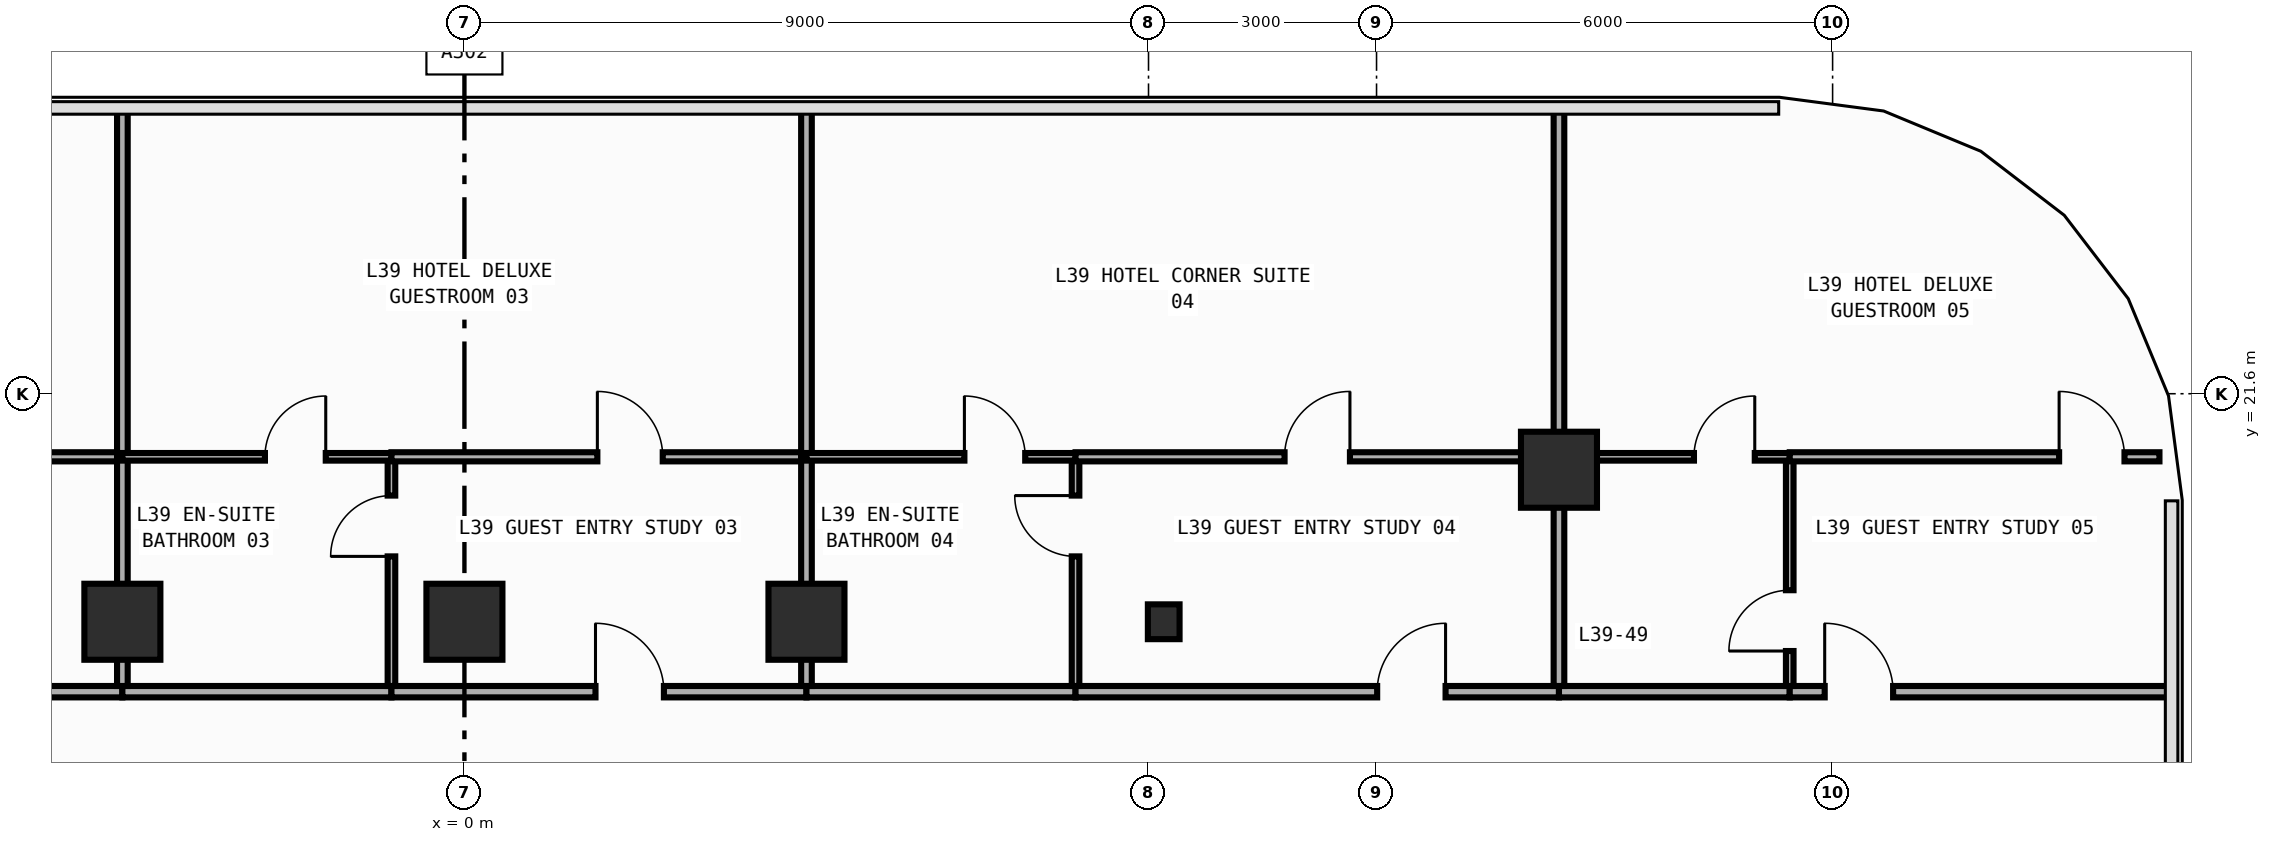
"""IFC4 building model, lengths in metres.
Left out: names, types, materials, properties, quantities, classifications, styles, units other than length and angle.
Written with IfcOpenShell. Run it as: python <this file> out.ifc"""

import sys

from ifc_helpers import new_model, si_unit, direction, frame, frame_2d, origin, origin_2d, place, context, subcontext, project, spatial, rectangle, i_section, extrude, element, fill, save


model = new_model("IFC4")
c1 = context("Model", 3, precision=1e-05, world=origin(), true_north=direction((0.0, 1.0)))
c2 = subcontext(c1, "Body", "Model", "MODEL_VIEW")
j1 = project(units=[si_unit("LENGTHUNIT", "METRE"), si_unit("PLANEANGLEUNIT", "RADIAN")], contexts=[c1])
p1 = place(None, origin())
s1 = spatial("IfcSite", under=j1, at=p1, CompositionType="ELEMENT")
p2 = place(p1, origin())
s2 = spatial("IfcBuilding", under=s1, at=p2, CompositionType="ELEMENT")
p3 = place(p2, frame((0.0, 0.0, 172.6)))
s3 = spatial("IfcBuildingStorey", under=s2, at=p3, CompositionType="ELEMENT", Elevation=172.6)
p4 = place(p3, frame((9.2, 18.6, 0.0), z_axis=(0.0, 0.0, 1.0), x_axis=(1.0, 0.0, 0.0)))
e1 = element("IfcColumn", 1, at=p4, inside=s3, PredefinedType="COLUMN", context=c2, shape_type="SweptSolid", body=[
    extrude(i_section(OverallWidth=0.417, OverallDepth=0.458, WebThickness=0.03, FlangeThickness=0.05, FilletRadius=0.022, at=origin_2d()), origin(), (0.0, 0.0, 1.0), 3.8),
])
for number, where, z_axis, x_axis in (
    (2, (-4.5, 18.6, 0.0), (0.0, 0.0, 1.0), (1.0, 0.0, 0.0)),
    (3, (0.0, 18.6, 0.0), (0.0, 0.0, 1.0), (1.0, 0.0, 0.0)),
    (4, (4.5, 18.6, 0.0), (0.0, 0.0, 1.0), (1.0, 0.0, 0.0)),
    (5, (14.4, 20.6, 0.0), (0.0, 0.0, 1.0), (1.0, 0.0, 0.0)),
):
    element("IfcColumn", number, at=place(p3, frame(where, z_axis=z_axis, x_axis=x_axis)), inside=s3, PredefinedType="COLUMN", context=c2, shape_type="SweptSolid", body=[
        extrude(rectangle(XDim=1.0, YDim=1.0, at=origin_2d()), origin(), (0.0, 0.0, 1.0), 3.8),
    ])
p5 = place(p3, frame((-10.86, 17.68, 0.0), z_axis=(0.0, 0.0, 1.0), x_axis=(1.0, 0.0, 0.0)))
e6 = element("IfcWall", 6, at=p5, inside=s3, PredefinedType="PARTITIONING", context=c2, shape_type="SweptSolid", body=[
    extrude(rectangle(XDim=6.36, YDim=0.15, at=frame_2d((3.18, 0.0))), origin(), (0.0, 0.0, 1.0), 3.54),
])
p6 = place(p5, frame((3.349, 0.0, 0.0)))
e7 = element("IfcOpeningElement", 7, at=p6, cuts=e6, PredefinedType="OPENING", context=c2, shape_type="SweptSolid", body=[
    extrude(rectangle(XDim=0.9, YDim=2.15, at=frame_2d((0.45, 1.075))), frame((0.0, 0.085, 0.0), z_axis=(0.0, -1.0, 0.0), x_axis=(1.0, 0.0, 0.0)), (0.0, 0.0, 1.0), 0.17),
])
p7 = place(p3, frame((-4.5, 17.68, 0.0), z_axis=(0.0, 0.0, 1.0), x_axis=(1.0, 0.0, 0.0)))
e8 = element("IfcWall", 8, at=p7, inside=s3, PredefinedType="PARTITIONING", context=c2, shape_type="SweptSolid", body=[
    extrude(rectangle(XDim=3.54, YDim=0.15, at=frame_2d((1.77, 0.0))), origin(), (0.0, 0.0, 1.0), 3.54),
])
p8 = place(p3, frame((-0.96, 17.68, 0.0), z_axis=(0.0, 0.0, 1.0), x_axis=(1.0, 0.0, 0.0)))
e9 = element("IfcWall", 9, at=p8, inside=s3, PredefinedType="PARTITIONING", context=c2, shape_type="SweptSolid", body=[
    extrude(rectangle(XDim=5.46, YDim=0.15, at=frame_2d((2.73, 0.0))), origin(), (0.0, 0.0, 1.0), 3.54),
])
p9 = place(p8, frame((2.684, 0.0, 0.0)))
e10 = element("IfcOpeningElement", 10, at=p9, cuts=e9, PredefinedType="OPENING", context=c2, shape_type="SweptSolid", body=[
    extrude(rectangle(XDim=0.9, YDim=2.15, at=frame_2d((0.45, 1.075))), frame((0.0, 0.085, 0.0), z_axis=(0.0, -1.0, 0.0), x_axis=(1.0, 0.0, 0.0)), (0.0, 0.0, 1.0), 0.17),
])
p10 = place(p3, frame((4.5, 17.68, 0.0), z_axis=(0.0, 0.0, 1.0), x_axis=(1.0, 0.0, 0.0)))
e11 = element("IfcWall", 11, at=p10, inside=s3, PredefinedType="PARTITIONING", context=c2, shape_type="SweptSolid", body=[
    extrude(rectangle(XDim=3.54, YDim=0.15, at=frame_2d((1.77, 0.0))), origin(), (0.0, 0.0, 1.0), 3.54),
])
p11 = place(p3, frame((8.04, 17.68, 0.0), z_axis=(0.0, 0.0, 1.0), x_axis=(1.0, 0.0, 0.0)))
e12 = element("IfcWall", 12, at=p11, inside=s3, PredefinedType="PARTITIONING", context=c2, shape_type="SweptSolid", body=[
    extrude(rectangle(XDim=6.36, YDim=0.15, at=frame_2d((3.18, 0.0))), origin(), (0.0, 0.0, 1.0), 3.54),
])
p12 = place(p11, frame((3.968, 0.0, 0.0)))
e13 = element("IfcOpeningElement", 13, at=p12, cuts=e12, PredefinedType="OPENING", context=c2, shape_type="SweptSolid", body=[
    extrude(rectangle(XDim=0.9, YDim=2.15, at=frame_2d((0.45, 1.075))), frame((0.0, 0.085, 0.0), z_axis=(0.0, -1.0, 0.0), x_axis=(1.0, 0.0, 0.0)), (0.0, 0.0, 1.0), 0.17),
])
p13 = place(p3, frame((14.4, 17.68, 0.0), z_axis=(0.0, 0.0, 1.0), x_axis=(1.0, 0.0, 0.0)))
e14 = element("IfcWall", 14, at=p13, inside=s3, PredefinedType="PARTITIONING", context=c2, shape_type="SweptSolid", body=[
    extrude(rectangle(XDim=3.036, YDim=0.15, at=frame_2d((1.518, 0.0))), origin(), (0.0, 0.0, 1.0), 3.54),
])
p14 = place(p3, frame((17.436, 17.68, 0.0), z_axis=(0.0, 0.0, 1.0), x_axis=(1.0, 0.0, 0.0)))
e15 = element("IfcWall", 15, at=p14, inside=s3, PredefinedType="PARTITIONING", context=c2, shape_type="SweptSolid", body=[
    extrude(rectangle(XDim=5.019, YDim=0.15, at=frame_2d((2.51, 0.0))), origin(), (0.0, 0.0, 1.0), 3.54),
])
p15 = place(p14, frame((0.46, 0.0, 0.0)))
e16 = element("IfcOpeningElement", 16, at=p15, cuts=e15, PredefinedType="OPENING", context=c2, shape_type="SweptSolid", body=[
    extrude(rectangle(XDim=0.9, YDim=2.15, at=frame_2d((0.45, 1.075))), frame((0.0, 0.085, 0.0), z_axis=(0.0, -1.0, 0.0), x_axis=(1.0, 0.0, 0.0)), (0.0, 0.0, 1.0), 0.17),
])
p16 = place(p3, frame((-10.86, 20.77, 0.0), z_axis=(0.0, 0.0, 1.0), x_axis=(1.0, 0.0, 0.0)))
e17 = element("IfcWall", 17, at=p16, inside=s3, PredefinedType="PARTITIONING", context=c2, shape_type="SweptSolid", body=[
    extrude(rectangle(XDim=6.36, YDim=0.12, at=frame_2d((3.18, 0.0))), origin(), (0.0, 0.0, 1.0), 3.54),
])
p17 = place(p16, frame((3.375, 0.0, 0.0)))
e18 = element("IfcOpeningElement", 18, at=p17, cuts=e17, PredefinedType="OPENING", context=c2, shape_type="SweptSolid", body=[
    extrude(rectangle(XDim=0.86, YDim=2.15, at=frame_2d((0.43, 1.075))), frame((0.0, 0.07, 0.0), z_axis=(0.0, -1.0, 0.0), x_axis=(1.0, 0.0, 0.0)), (0.0, 0.0, 1.0), 0.14),
])
p18 = place(p3, frame((-4.5, 17.755, 0.0), z_axis=(0.0, 0.0, 1.0), x_axis=(0.0, 1.0, 0.0)))
e19 = element("IfcWall", 19, at=p18, inside=s3, PredefinedType="PARTITIONING", context=c2, shape_type="SweptSolid", body=[
    extrude(rectangle(XDim=3.015, YDim=0.14, at=frame_2d((1.508, 0.0))), origin(), (0.0, 0.0, 1.0), 3.54),
])
p19 = place(p3, frame((-4.5, 20.77, 0.0), z_axis=(0.0, 0.0, 1.0), x_axis=(0.0, 1.0, 0.0)))
e20 = element("IfcWall", 20, at=p19, inside=s3, PredefinedType="PARTITIONING", context=c2, shape_type="SweptSolid", body=[
    extrude(rectangle(XDim=4.585, YDim=0.14, at=frame_2d((2.292, 0.0))), origin(), (0.0, 0.0, 1.0), 3.54),
])
p20 = place(p3, frame((-0.96, 17.755, 0.0), z_axis=(0.0, 0.0, 1.0), x_axis=(0.0, 1.0, 0.0)))
e21 = element("IfcWall", 21, at=p20, inside=s3, PredefinedType="PARTITIONING", context=c2, shape_type="SweptSolid", body=[
    extrude(rectangle(XDim=2.965, YDim=0.1, at=frame_2d((1.482, 0.0))), origin(), (0.0, 0.0, 1.0), 3.54),
])
p21 = place(p20, frame((1.705, 0.0, 0.0)))
e22 = element("IfcOpeningElement", 22, at=p21, cuts=e21, PredefinedType="OPENING", context=c2, shape_type="SweptSolid", body=[
    extrude(rectangle(XDim=0.8, YDim=2.1, at=frame_2d((0.4, 1.05))), frame((0.0, 0.06, 0.0), z_axis=(0.0, -1.0, 0.0), x_axis=(1.0, 0.0, 0.0)), (0.0, 0.0, 1.0), 0.12),
])
p22 = place(p3, frame((-4.5, 20.77, 0.0), z_axis=(0.0, 0.0, 1.0), x_axis=(1.0, 0.0, 0.0)))
e23 = element("IfcWall", 23, at=p22, inside=s3, PredefinedType="PARTITIONING", context=c2, shape_type="SweptSolid", body=[
    extrude(rectangle(XDim=3.54, YDim=0.1, at=frame_2d((1.77, 0.0))), origin(), (0.0, 0.0, 1.0), 3.54),
])
p23 = place(p22, frame((1.875, 0.0, 0.0)))
e24 = element("IfcOpeningElement", 24, at=p23, cuts=e23, PredefinedType="OPENING", context=c2, shape_type="SweptSolid", body=[
    extrude(rectangle(XDim=0.8, YDim=2.1, at=frame_2d((0.4, 1.05))), frame((0.0, 0.06, 0.0), z_axis=(0.0, -1.0, 0.0), x_axis=(1.0, 0.0, 0.0)), (0.0, 0.0, 1.0), 0.12),
])
p24 = place(p3, frame((-0.96, 20.77, 0.0), z_axis=(0.0, 0.0, 1.0), x_axis=(1.0, 0.0, 0.0)))
e25 = element("IfcWall", 25, at=p24, inside=s3, PredefinedType="PARTITIONING", context=c2, shape_type="SweptSolid", body=[
    extrude(rectangle(XDim=5.46, YDim=0.12, at=frame_2d((2.73, 0.0))), origin(), (0.0, 0.0, 1.0), 3.54),
])
p25 = place(p24, frame((2.709, 0.0, 0.0)))
e26 = element("IfcOpeningElement", 26, at=p25, cuts=e25, PredefinedType="OPENING", context=c2, shape_type="SweptSolid", body=[
    extrude(rectangle(XDim=0.86, YDim=2.15, at=frame_2d((0.43, 1.075))), frame((0.0, 0.07, 0.0), z_axis=(0.0, -1.0, 0.0), x_axis=(1.0, 0.0, 0.0)), (0.0, 0.0, 1.0), 0.14),
])
p26 = place(p3, frame((4.5, 17.755, 0.0), z_axis=(0.0, 0.0, 1.0), x_axis=(0.0, 1.0, 0.0)))
e27 = element("IfcWall", 27, at=p26, inside=s3, PredefinedType="PARTITIONING", context=c2, shape_type="SweptSolid", body=[
    extrude(rectangle(XDim=3.015, YDim=0.14, at=frame_2d((1.508, 0.0))), origin(), (0.0, 0.0, 1.0), 3.54),
])
p27 = place(p3, frame((4.5, 20.77, 0.0), z_axis=(0.0, 0.0, 1.0), x_axis=(0.0, 1.0, 0.0)))
e28 = element("IfcWall", 28, at=p27, inside=s3, PredefinedType="PARTITIONING", context=c2, shape_type="SweptSolid", body=[
    extrude(rectangle(XDim=4.585, YDim=0.14, at=frame_2d((2.292, 0.0))), origin(), (0.0, 0.0, 1.0), 3.54),
])
p28 = place(p3, frame((8.04, 17.755, 0.0), z_axis=(0.0, 0.0, 1.0), x_axis=(0.0, 1.0, 0.0)))
e29 = element("IfcWall", 29, at=p28, inside=s3, PredefinedType="PARTITIONING", context=c2, shape_type="SweptSolid", body=[
    extrude(rectangle(XDim=2.965, YDim=0.1, at=frame_2d((1.482, 0.0))), origin(), (0.0, 0.0, 1.0), 3.54),
])
p29 = place(p28, frame((1.705, 0.0, 0.0)))
e30 = element("IfcOpeningElement", 30, at=p29, cuts=e29, PredefinedType="OPENING", context=c2, shape_type="SweptSolid", body=[
    extrude(rectangle(XDim=0.8, YDim=2.1, at=frame_2d((0.4, 1.05))), frame((0.0, 0.06, 0.0), z_axis=(0.0, -1.0, 0.0), x_axis=(1.0, 0.0, 0.0)), (0.0, 0.0, 1.0), 0.12),
])
p30 = place(p3, frame((4.5, 20.77, 0.0), z_axis=(0.0, 0.0, 1.0), x_axis=(1.0, 0.0, 0.0)))
e31 = element("IfcWall", 31, at=p30, inside=s3, PredefinedType="PARTITIONING", context=c2, shape_type="SweptSolid", body=[
    extrude(rectangle(XDim=3.54, YDim=0.1, at=frame_2d((1.77, 0.0))), origin(), (0.0, 0.0, 1.0), 3.54),
])
p31 = place(p30, frame((2.078, 0.0, 0.0)))
e32 = element("IfcOpeningElement", 32, at=p31, cuts=e31, PredefinedType="OPENING", context=c2, shape_type="SweptSolid", body=[
    extrude(rectangle(XDim=0.8, YDim=2.1, at=frame_2d((0.4, 1.05))), frame((0.0, 0.06, 0.0), z_axis=(0.0, -1.0, 0.0), x_axis=(1.0, 0.0, 0.0)), (0.0, 0.0, 1.0), 0.12),
])
p32 = place(p3, frame((8.04, 20.77, 0.0), z_axis=(0.0, 0.0, 1.0), x_axis=(1.0, 0.0, 0.0)))
e33 = element("IfcWall", 33, at=p32, inside=s3, PredefinedType="PARTITIONING", context=c2, shape_type="SweptSolid", body=[
    extrude(rectangle(XDim=6.36, YDim=0.12, at=frame_2d((3.18, 0.0))), origin(), (0.0, 0.0, 1.0), 3.54),
])
p33 = place(p32, frame((2.75, 0.0, 0.0)))
e34 = element("IfcOpeningElement", 34, at=p33, cuts=e33, PredefinedType="OPENING", context=c2, shape_type="SweptSolid", body=[
    extrude(rectangle(XDim=0.86, YDim=2.15, at=frame_2d((0.43, 1.075))), frame((0.0, 0.07, 0.0), z_axis=(0.0, -1.0, 0.0), x_axis=(1.0, 0.0, 0.0)), (0.0, 0.0, 1.0), 0.14),
])
p34 = place(p3, frame((14.4, 17.755, 0.0), z_axis=(0.0, 0.0, 1.0), x_axis=(0.0, 1.0, 0.0)))
e35 = element("IfcWall", 35, at=p34, inside=s3, PredefinedType="PARTITIONING", context=c2, shape_type="SweptSolid", body=[
    extrude(rectangle(XDim=3.015, YDim=0.14, at=frame_2d((1.508, 0.0))), origin(), (0.0, 0.0, 1.0), 2.952),
])
p35 = place(p3, frame((14.4, 20.77, 0.0), z_axis=(0.0, 0.0, 1.0), x_axis=(0.0, 1.0, 0.0)))
e36 = element("IfcWall", 36, at=p35, inside=s3, PredefinedType="PARTITIONING", context=c2, shape_type="SweptSolid", body=[
    extrude(rectangle(XDim=4.585, YDim=0.14, at=frame_2d((2.292, 0.0))), origin(), (0.0, 0.0, 1.0), 2.952),
])
p36 = place(p3, frame((17.436, 17.755, 0.0), z_axis=(0.0, 0.0, 1.0), x_axis=(0.0, 1.0, 0.0)))
e37 = element("IfcWall", 37, at=p36, inside=s3, PredefinedType="PARTITIONING", context=c2, shape_type="SweptSolid", body=[
    extrude(rectangle(XDim=2.965, YDim=0.1, at=frame_2d((1.482, 0.0))), origin(), (0.0, 0.0, 1.0), 3.54),
])
p37 = place(p36, frame((0.46, 0.0, 0.0)))
e38 = element("IfcOpeningElement", 38, at=p37, cuts=e37, PredefinedType="OPENING", context=c2, shape_type="SweptSolid", body=[
    extrude(rectangle(XDim=0.8, YDim=2.1, at=frame_2d((0.4, 1.05))), frame((0.0, 0.06, 0.0), z_axis=(0.0, -1.0, 0.0), x_axis=(1.0, 0.0, 0.0)), (0.0, 0.0, 1.0), 0.12),
])
p38 = place(p3, frame((14.4, 20.77, 0.0), z_axis=(0.0, 0.0, 1.0), x_axis=(1.0, 0.0, 0.0)))
e39 = element("IfcWall", 39, at=p38, inside=s3, PredefinedType="PARTITIONING", context=c2, shape_type="SweptSolid", body=[
    extrude(rectangle(XDim=3.036, YDim=0.1, at=frame_2d((1.518, 0.0))), origin(), (0.0, 0.0, 1.0), 3.54),
])
p39 = place(p38, frame((1.776, 0.0, 0.0)))
e40 = element("IfcOpeningElement", 40, at=p39, cuts=e39, PredefinedType="OPENING", context=c2, shape_type="SweptSolid", body=[
    extrude(rectangle(XDim=0.8, YDim=2.1, at=frame_2d((0.4, 1.05))), frame((0.0, 0.06, 0.0), z_axis=(0.0, -1.0, 0.0), x_axis=(1.0, 0.0, 0.0)), (0.0, 0.0, 1.0), 0.12),
])
p40 = place(p3, frame((17.436, 20.77, 0.0), z_axis=(0.0, 0.0, 1.0), x_axis=(1.0, 0.0, 0.0)))
e41 = element("IfcWall", 41, at=p40, inside=s3, PredefinedType="PARTITIONING", context=c2, shape_type="SweptSolid", body=[
    extrude(rectangle(XDim=4.864, YDim=0.12, at=frame_2d((2.432, 0.0))), origin(), (0.0, 0.0, 1.0), 3.54),
])
p41 = place(p40, frame((3.544, 0.0, 0.0)))
e42 = element("IfcOpeningElement", 42, at=p41, cuts=e41, PredefinedType="OPENING", context=c2, shape_type="SweptSolid", body=[
    extrude(rectangle(XDim=0.86, YDim=2.15, at=frame_2d((0.43, 1.075))), frame((0.0, 0.07, 0.0), z_axis=(0.0, -1.0, 0.0), x_axis=(1.0, 0.0, 0.0)), (0.0, 0.0, 1.0), 0.14),
])
p42 = place(p9, origin())
e43 = element("IfcDoor", 43, at=p42, inside=s3, OperationType="SINGLE_SWING_LEFT", PredefinedType="DOOR", context=c2, shape_type="SweptSolid", body=[
    extrude(rectangle(XDim=0.9, YDim=2.15, at=frame_2d((0.45, 1.075))), frame((0.0, 0.025, 0.0), z_axis=(0.0, -1.0, 0.0), x_axis=(1.0, 0.0, 0.0)), (0.0, 0.0, 1.0), 0.05),
])
fill(e10, e43)
p43 = place(p12, origin())
e44 = element("IfcDoor", 44, at=p43, inside=s3, OperationType="SINGLE_SWING_RIGHT", PredefinedType="DOOR", context=c2, shape_type="SweptSolid", body=[
    extrude(rectangle(XDim=0.9, YDim=2.15, at=frame_2d((0.45, 1.075))), frame((0.0, 0.025, 0.0), z_axis=(0.0, -1.0, 0.0), x_axis=(1.0, 0.0, 0.0)), (0.0, 0.0, 1.0), 0.05),
])
fill(e13, e44)
p44 = place(p15, origin())
e45 = element("IfcDoor", 45, at=p44, inside=s3, OperationType="SINGLE_SWING_LEFT", PredefinedType="DOOR", context=c2, shape_type="SweptSolid", body=[
    extrude(rectangle(XDim=0.9, YDim=2.15, at=frame_2d((0.45, 1.075))), frame((0.0, 0.025, 0.0), z_axis=(0.0, -1.0, 0.0), x_axis=(1.0, 0.0, 0.0)), (0.0, 0.0, 1.0), 0.05),
])
fill(e16, e45)
p45 = place(p21, origin())
e46 = element("IfcDoor", 46, at=p45, inside=s3, OperationType="SINGLE_SWING_LEFT", PredefinedType="DOOR", context=c2, shape_type="SweptSolid", body=[
    extrude(rectangle(XDim=0.8, YDim=2.1, at=frame_2d((0.4, 1.05))), frame((0.0, 0.025, 0.0), z_axis=(0.0, -1.0, 0.0), x_axis=(1.0, 0.0, 0.0)), (0.0, 0.0, 1.0), 0.05),
])
fill(e22, e46)
p46 = place(p23, origin())
e47 = element("IfcDoor", 47, at=p46, inside=s3, OperationType="SINGLE_SWING_RIGHT", PredefinedType="DOOR", context=c2, shape_type="SweptSolid", body=[
    extrude(rectangle(XDim=0.8, YDim=2.1, at=frame_2d((0.4, 1.05))), frame((0.0, 0.025, 0.0), z_axis=(0.0, -1.0, 0.0), x_axis=(1.0, 0.0, 0.0)), (0.0, 0.0, 1.0), 0.05),
])
fill(e24, e47)
p47 = place(p25, origin())
e48 = element("IfcDoor", 48, at=p47, inside=s3, OperationType="SINGLE_SWING_LEFT", PredefinedType="DOOR", context=c2, shape_type="SweptSolid", body=[
    extrude(rectangle(XDim=0.86, YDim=2.15, at=frame_2d((0.43, 1.075))), frame((0.0, 0.025, 0.0), z_axis=(0.0, -1.0, 0.0), x_axis=(1.0, 0.0, 0.0)), (0.0, 0.0, 1.0), 0.05),
])
fill(e26, e48)
p48 = place(p29, origin())
e49 = element("IfcDoor", 49, at=p48, inside=s3, OperationType="SINGLE_SWING_RIGHT", PredefinedType="DOOR", context=c2, shape_type="SweptSolid", body=[
    extrude(rectangle(XDim=0.8, YDim=2.1, at=frame_2d((0.4, 1.05))), frame((0.0, 0.025, 0.0), z_axis=(0.0, -1.0, 0.0), x_axis=(1.0, 0.0, 0.0)), (0.0, 0.0, 1.0), 0.05),
])
fill(e30, e49)
p49 = place(p31, origin())
e50 = element("IfcDoor", 50, at=p49, inside=s3, OperationType="SINGLE_SWING_LEFT", PredefinedType="DOOR", context=c2, shape_type="SweptSolid", body=[
    extrude(rectangle(XDim=0.8, YDim=2.1, at=frame_2d((0.4, 1.05))), frame((0.0, 0.025, 0.0), z_axis=(0.0, -1.0, 0.0), x_axis=(1.0, 0.0, 0.0)), (0.0, 0.0, 1.0), 0.05),
])
fill(e32, e50)
p50 = place(p33, origin())
e51 = element("IfcDoor", 51, at=p50, inside=s3, OperationType="SINGLE_SWING_RIGHT", PredefinedType="DOOR", context=c2, shape_type="SweptSolid", body=[
    extrude(rectangle(XDim=0.86, YDim=2.15, at=frame_2d((0.43, 1.075))), frame((0.0, 0.025, 0.0), z_axis=(0.0, -1.0, 0.0), x_axis=(1.0, 0.0, 0.0)), (0.0, 0.0, 1.0), 0.05),
])
fill(e34, e51)
p51 = place(p37, origin())
e52 = element("IfcDoor", 52, at=p51, inside=s3, OperationType="SINGLE_SWING_LEFT", PredefinedType="DOOR", context=c2, shape_type="SweptSolid", body=[
    extrude(rectangle(XDim=0.8, YDim=2.1, at=frame_2d((0.4, 1.05))), frame((0.0, 0.025, 0.0), z_axis=(0.0, -1.0, 0.0), x_axis=(1.0, 0.0, 0.0)), (0.0, 0.0, 1.0), 0.05),
])
fill(e38, e52)
p52 = place(p39, origin())
e53 = element("IfcDoor", 53, at=p52, inside=s3, OperationType="SINGLE_SWING_RIGHT", PredefinedType="DOOR", context=c2, shape_type="SweptSolid", body=[
    extrude(rectangle(XDim=0.8, YDim=2.1, at=frame_2d((0.4, 1.05))), frame((0.0, 0.025, 0.0), z_axis=(0.0, -1.0, 0.0), x_axis=(1.0, 0.0, 0.0)), (0.0, 0.0, 1.0), 0.05),
])
fill(e40, e53)
p53 = place(p41, origin())
e54 = element("IfcDoor", 54, at=p53, inside=s3, OperationType="SINGLE_SWING_LEFT", PredefinedType="DOOR", context=c2, shape_type="SweptSolid", body=[
    extrude(rectangle(XDim=0.86, YDim=2.15, at=frame_2d((0.43, 1.075))), frame((0.0, 0.025, 0.0), z_axis=(0.0, -1.0, 0.0), x_axis=(1.0, 0.0, 0.0)), (0.0, 0.0, 1.0), 0.05),
])
fill(e42, e54)
save(model, sys.argv[1])
